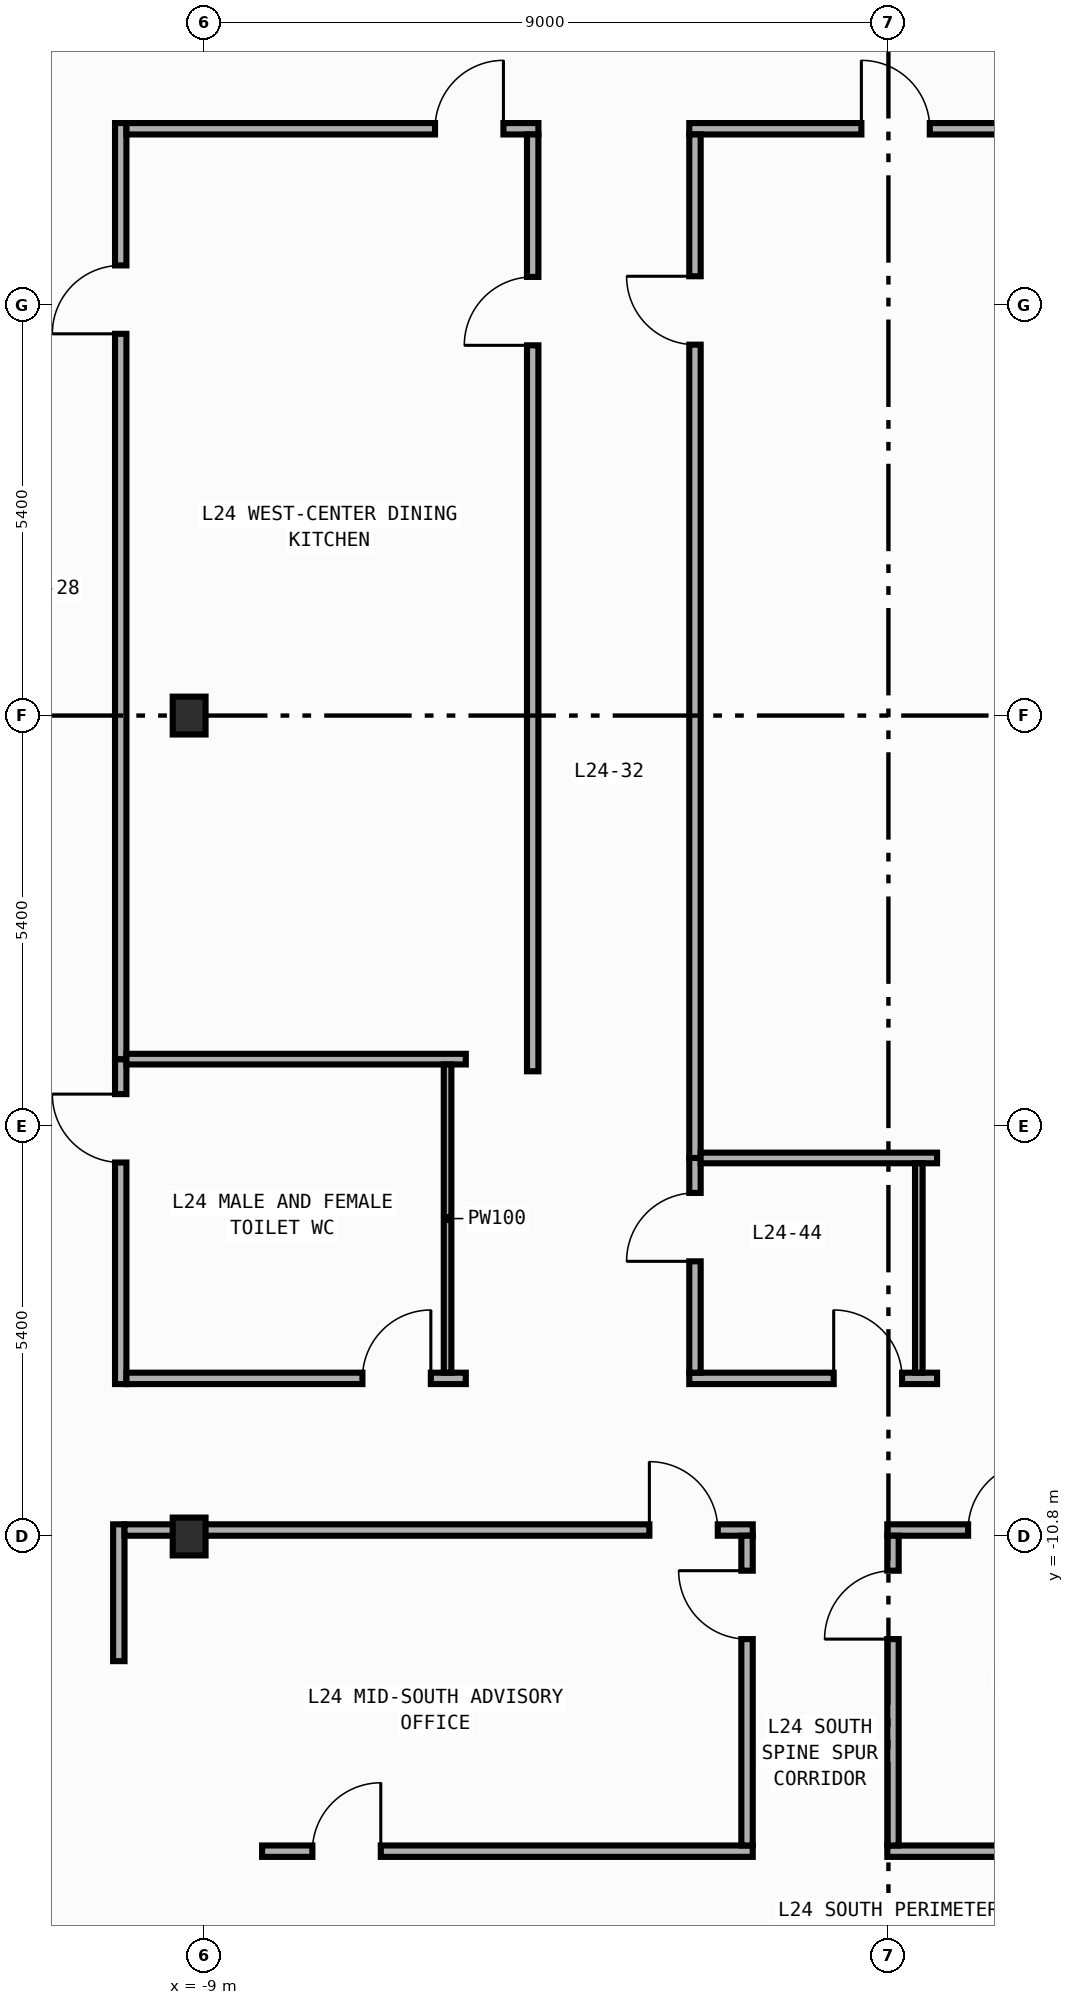
"""IFC4 building model, lengths in metres.
Left out: names, types, materials, properties, quantities, classifications, styles, units other than length and angle.
Written with IfcOpenShell. Run it as: python <this file> out.ifc"""

import sys

from ifc_helpers import new_model, si_unit, direction, frame, frame_2d, origin, origin_2d, place, context, subcontext, project, spatial, rectangle, i_section, extrude, element, fill, save


model = new_model("IFC4")
c1 = context("Model", 3, precision=1e-05, world=origin(), true_north=direction((0.0, 1.0)))
c2 = subcontext(c1, "Body", "Model", "MODEL_VIEW")
j1 = project(units=[si_unit("LENGTHUNIT", "METRE"), si_unit("PLANEANGLEUNIT", "RADIAN")], contexts=[c1])
p1 = place(None, origin())
s1 = spatial("IfcSite", under=j1, at=p1, CompositionType="ELEMENT")
p2 = place(p1, origin())
s2 = spatial("IfcBuilding", under=s1, at=p2, CompositionType="ELEMENT")
p3 = place(p2, frame((0.0, 0.0, 105.8)))
s3 = spatial("IfcBuildingStorey", under=s2, at=p3, CompositionType="ELEMENT", Elevation=105.8)
for number, where, z_axis, x_axis in (
    (1, (-9.2, -10.8, 0.0), (0.0, 0.0, 1.0), (1.0, 0.0, 0.0)),
    (2, (-9.2, 0.0, 0.0), (0.0, 0.0, 1.0), (1.0, 0.0, 0.0)),
):
    element("IfcColumn", number, at=place(p3, frame(where, z_axis=z_axis, x_axis=x_axis)), inside=s3, PredefinedType="COLUMN", context=c2, shape_type="SweptSolid", body=[
        extrude(i_section(OverallWidth=0.432, OverallDepth=0.498, WebThickness=0.045, FlangeThickness=0.07, FilletRadius=0.022, at=origin_2d()), origin(), (0.0, 0.0, 1.0), 4.2),
    ])
p4 = place(p3, frame((-10.1, -8.795, 0.0), z_axis=(0.0, 0.0, 1.0), x_axis=(0.0, 1.0, 0.0)))
e3 = element("IfcWall", 3, at=p4, inside=s3, PredefinedType="PARTITIONING", context=c2, shape_type="SweptSolid", body=[
    extrude(rectangle(XDim=4.275, YDim=0.15, at=frame_2d((2.137, 0.0))), origin(), (0.0, 0.0, 1.0), 3.94),
])
p5 = place(p4, frame((2.915, 0.0, 0.0)))
e4 = element("IfcOpeningElement", 4, at=p5, cuts=e3, PredefinedType="OPENING", context=c2, shape_type="SweptSolid", body=[
    extrude(rectangle(XDim=0.9, YDim=2.15, at=frame_2d((0.45, 1.075))), frame((0.0, 0.085, 0.0), z_axis=(0.0, -1.0, 0.0), x_axis=(1.0, 0.0, 0.0)), (0.0, 0.0, 1.0), 0.17),
])
p6 = place(p3, frame((-10.1, -4.52, 0.0), z_axis=(0.0, 0.0, 1.0), x_axis=(0.0, 1.0, 0.0)))
e5 = element("IfcWall", 5, at=p6, inside=s3, PredefinedType="PARTITIONING", context=c2, shape_type="SweptSolid", body=[
    extrude(rectangle(XDim=12.315, YDim=0.15, at=frame_2d((6.157, 0.0))), origin(), (0.0, 0.0, 1.0), 3.94),
])
p7 = place(p6, frame((9.542, 0.0, 0.0)))
e6 = element("IfcOpeningElement", 6, at=p7, cuts=e5, PredefinedType="OPENING", context=c2, shape_type="SweptSolid", body=[
    extrude(rectangle(XDim=0.9, YDim=2.15, at=frame_2d((0.45, 1.075))), frame((0.0, 0.085, 0.0), z_axis=(0.0, -1.0, 0.0), x_axis=(1.0, 0.0, 0.0)), (0.0, 0.0, 1.0), 0.17),
])
p8 = place(p3, frame((-10.125, -12.44, 0.0), z_axis=(0.0, 0.0, 1.0), x_axis=(0.0, 1.0, 0.0)))
e7 = element("IfcWall", 7, at=p8, inside=s3, PredefinedType="PARTITIONING", context=c2, shape_type="SweptSolid", body=[
    extrude(rectangle(XDim=1.8, YDim=0.15, at=frame_2d((0.9, 0.0))), origin(), (0.0, 0.0, 1.0), 3.94),
])
p9 = place(p3, frame((-2.62, 7.72, 0.0), z_axis=(0.0, 0.0, 1.0), x_axis=(1.0, 0.0, 0.0)))
e8 = element("IfcWall", 8, at=p9, inside=s3, PredefinedType="PARTITIONING", context=c2, shape_type="SweptSolid", body=[
    extrude(rectangle(XDim=12.645, YDim=0.15, at=frame_2d((6.323, 0.0))), origin(), (0.0, 0.0, 1.0), 3.94),
])
p10 = place(p9, frame((2.264, 0.0, 0.0)))
e9 = element("IfcOpeningElement", 9, at=p10, cuts=e8, PredefinedType="OPENING", context=c2, shape_type="SweptSolid", body=[
    extrude(rectangle(XDim=0.9, YDim=2.15, at=frame_2d((0.45, 1.075))), frame((0.0, 0.085, 0.0), z_axis=(0.0, -1.0, 0.0), x_axis=(1.0, 0.0, 0.0)), (0.0, 0.0, 1.0), 0.17),
])
p11 = place(p3, frame((-10.025, 7.72, 0.0), z_axis=(0.0, 0.0, 1.0), x_axis=(1.0, 0.0, 0.0)))
e10 = element("IfcWall", 10, at=p11, inside=s3, PredefinedType="PARTITIONING", context=c2, shape_type="SweptSolid", body=[
    extrude(rectangle(XDim=5.42, YDim=0.15, at=frame_2d((2.71, 0.0))), origin(), (0.0, 0.0, 1.0), 3.94),
])
p12 = place(p11, frame((4.06, 0.0, 0.0)))
e11 = element("IfcOpeningElement", 11, at=p12, cuts=e10, PredefinedType="OPENING", context=c2, shape_type="SweptSolid", body=[
    extrude(rectangle(XDim=0.9, YDim=2.15, at=frame_2d((0.45, 1.075))), frame((0.0, 0.085, 0.0), z_axis=(0.0, -1.0, 0.0), x_axis=(1.0, 0.0, 0.0)), (0.0, 0.0, 1.0), 0.17),
])
p13 = place(p3, frame((-2.62, -8.72, 0.0), z_axis=(0.0, 0.0, 1.0), x_axis=(1.0, 0.0, 0.0)))
e12 = element("IfcWall", 12, at=p13, inside=s3, PredefinedType="PARTITIONING", context=c2, shape_type="SweptSolid", body=[
    extrude(rectangle(XDim=3.26, YDim=0.15, at=frame_2d((1.63, 0.0))), origin(), (0.0, 0.0, 1.0), 3.94),
])
p14 = place(p13, frame((1.9, 0.0, 0.0)))
e13 = element("IfcOpeningElement", 13, at=p14, cuts=e12, PredefinedType="OPENING", context=c2, shape_type="SweptSolid", body=[
    extrude(rectangle(XDim=0.9, YDim=2.15, at=frame_2d((0.45, 1.075))), frame((0.0, 0.085, 0.0), z_axis=(0.0, -1.0, 0.0), x_axis=(1.0, 0.0, 0.0)), (0.0, 0.0, 1.0), 0.17),
])
p15 = place(p3, frame((-10.025, -8.72, 0.0), z_axis=(0.0, 0.0, 1.0), x_axis=(1.0, 0.0, 0.0)))
e14 = element("IfcWall", 14, at=p15, inside=s3, PredefinedType="PARTITIONING", context=c2, shape_type="SweptSolid", body=[
    extrude(rectangle(XDim=4.465, YDim=0.15, at=frame_2d((2.232, 0.0))), origin(), (0.0, 0.0, 1.0), 3.94),
])
p16 = place(p15, frame((3.105, 0.0, 0.0)))
e15 = element("IfcOpeningElement", 15, at=p16, cuts=e14, PredefinedType="OPENING", context=c2, shape_type="SweptSolid", body=[
    extrude(rectangle(XDim=0.9, YDim=2.15, at=frame_2d((0.45, 1.075))), frame((0.0, 0.085, 0.0), z_axis=(0.0, -1.0, 0.0), x_axis=(1.0, 0.0, 0.0)), (0.0, 0.0, 1.0), 0.17),
])
p17 = place(p3, frame((-10.05, -10.715, 0.0), z_axis=(0.0, 0.0, 1.0), x_axis=(1.0, 0.0, 0.0)))
e16 = element("IfcWall", 16, at=p17, inside=s3, PredefinedType="PARTITIONING", context=c2, shape_type="SweptSolid", body=[
    extrude(rectangle(XDim=8.265, YDim=0.15, at=frame_2d((4.133, 0.0))), origin(), (0.0, 0.0, 1.0), 3.24),
])
p18 = place(p17, frame((6.905, 0.0, 0.0)))
e17 = element("IfcOpeningElement", 17, at=p18, cuts=e16, PredefinedType="OPENING", context=c2, shape_type="SweptSolid", body=[
    extrude(rectangle(XDim=0.9, YDim=2.15, at=frame_2d((0.45, 1.075))), frame((0.0, 0.085, 0.0), z_axis=(0.0, -1.0, 0.0), x_axis=(1.0, 0.0, 0.0)), (0.0, 0.0, 1.0), 0.17),
])
p19 = place(p3, frame((-0.015, -10.715, 0.0), z_axis=(0.0, 0.0, 1.0), x_axis=(1.0, 0.0, 0.0)))
e18 = element("IfcWall", 18, at=p19, inside=s3, PredefinedType="PARTITIONING", context=c2, shape_type="SweptSolid", body=[
    extrude(rectangle(XDim=10.065, YDim=0.15, at=frame_2d((5.032, 0.0))), origin(), (0.0, 0.0, 1.0), 3.24),
])
p20 = place(p19, frame((1.063, 0.0, 0.0)))
e19 = element("IfcOpeningElement", 19, at=p20, cuts=e18, PredefinedType="OPENING", context=c2, shape_type="SweptSolid", body=[
    extrude(rectangle(XDim=0.9, YDim=2.15, at=frame_2d((0.45, 1.075))), frame((0.0, 0.085, 0.0), z_axis=(0.0, -1.0, 0.0), x_axis=(1.0, 0.0, 0.0)), (0.0, 0.0, 1.0), 0.17),
])
p21 = place(p3, frame((-2.545, -8.645, 0.0), z_axis=(0.0, 0.0, 1.0), x_axis=(0.0, 1.0, 0.0)))
e20 = element("IfcWall", 20, at=p21, inside=s3, PredefinedType="PARTITIONING", context=c2, shape_type="SweptSolid", body=[
    extrude(rectangle(XDim=2.825, YDim=0.15, at=frame_2d((1.413, 0.0))), origin(), (0.0, 0.0, 1.0), 3.94),
])
p22 = place(p21, frame((1.465, 0.0, 0.0)))
e21 = element("IfcOpeningElement", 21, at=p22, cuts=e20, PredefinedType="OPENING", context=c2, shape_type="SweptSolid", body=[
    extrude(rectangle(XDim=0.9, YDim=2.15, at=frame_2d((0.45, 1.075))), frame((0.0, 0.085, 0.0), z_axis=(0.0, -1.0, 0.0), x_axis=(1.0, 0.0, 0.0)), (0.0, 0.0, 1.0), 0.17),
])
p23 = place(p3, frame((-2.545, -5.82, 0.0), z_axis=(0.0, 0.0, 1.0), x_axis=(0.0, 1.0, 0.0)))
e22 = element("IfcWall", 22, at=p23, inside=s3, PredefinedType="PARTITIONING", context=c2, shape_type="SweptSolid", body=[
    extrude(rectangle(XDim=13.465, YDim=0.15, at=frame_2d((6.732, 0.0))), origin(), (0.0, 0.0, 1.0), 3.94),
])
p24 = place(p23, frame((10.7, 0.0, 0.0)))
e23 = element("IfcOpeningElement", 23, at=p24, cuts=e22, PredefinedType="OPENING", context=c2, shape_type="SweptSolid", body=[
    extrude(rectangle(XDim=0.9, YDim=2.15, at=frame_2d((0.45, 1.075))), frame((0.0, 0.085, 0.0), z_axis=(0.0, -1.0, 0.0), x_axis=(1.0, 0.0, 0.0)), (0.0, 0.0, 1.0), 0.17),
])
p25 = place(p3, frame((-4.68, -4.68, 0.0), z_axis=(0.0, 0.0, 1.0), x_axis=(0.0, 1.0, 0.0)))
e24 = element("IfcWall", 24, at=p25, inside=s3, PredefinedType="PARTITIONING", context=c2, shape_type="SweptSolid", body=[
    extrude(rectangle(XDim=12.325, YDim=0.15, at=frame_2d((6.163, 0.0))), origin(), (0.0, 0.0, 1.0), 3.49),
])
p26 = place(p25, frame((9.551, 0.0, 0.0)))
e25 = element("IfcOpeningElement", 25, at=p26, cuts=e24, PredefinedType="OPENING", context=c2, shape_type="SweptSolid", body=[
    extrude(rectangle(XDim=0.9, YDim=2.15, at=frame_2d((0.45, 1.075))), frame((0.0, 0.085, 0.0), z_axis=(0.0, -1.0, 0.0), x_axis=(1.0, 0.0, 0.0)), (0.0, 0.0, 1.0), 0.17),
])
p27 = place(p3, frame((-8.24, -14.94, 0.0), z_axis=(0.0, 0.0, 1.0), x_axis=(1.0, 0.0, 0.0)))
e26 = element("IfcWall", 26, at=p27, inside=s3, PredefinedType="PARTITIONING", context=c2, shape_type="SweptSolid", body=[
    extrude(rectangle(XDim=6.455, YDim=0.15, at=frame_2d((3.228, 0.0))), origin(), (0.0, 0.0, 1.0), 3.94),
])
p28 = place(p27, frame((0.662, 0.0, 0.0)))
e27 = element("IfcOpeningElement", 27, at=p28, cuts=e26, PredefinedType="OPENING", context=c2, shape_type="SweptSolid", body=[
    extrude(rectangle(XDim=0.9, YDim=2.15, at=frame_2d((0.45, 1.075))), frame((0.0, 0.085, 0.0), z_axis=(0.0, -1.0, 0.0), x_axis=(1.0, 0.0, 0.0)), (0.0, 0.0, 1.0), 0.17),
])
p29 = place(p3, frame((-0.015, -14.94, 0.0), z_axis=(0.0, 0.0, 1.0), x_axis=(1.0, 0.0, 0.0)))
e28 = element("IfcWall", 28, at=p29, inside=s3, PredefinedType="PARTITIONING", context=c2, shape_type="SweptSolid", body=[
    extrude(rectangle(XDim=8.255, YDim=0.15, at=frame_2d((4.127, 0.0))), origin(), (0.0, 0.0, 1.0), 3.94),
])
p30 = place(p29, frame((6.694, 0.0, 0.0)))
e29 = element("IfcOpeningElement", 29, at=p30, cuts=e28, PredefinedType="OPENING", context=c2, shape_type="SweptSolid", body=[
    extrude(rectangle(XDim=0.9, YDim=2.15, at=frame_2d((0.45, 1.075))), frame((0.0, 0.085, 0.0), z_axis=(0.0, -1.0, 0.0), x_axis=(1.0, 0.0, 0.0)), (0.0, 0.0, 1.0), 0.17),
])
p31 = place(p3, frame((-1.86, -14.865, 0.0), z_axis=(0.0, 0.0, 1.0), x_axis=(0.0, 1.0, 0.0)))
e30 = element("IfcWall", 30, at=p31, inside=s3, PredefinedType="PARTITIONING", context=c2, shape_type="SweptSolid", body=[
    extrude(rectangle(XDim=4.075, YDim=0.15, at=frame_2d((2.038, 0.0))), origin(), (0.0, 0.0, 1.0), 3.94),
])
p32 = place(p31, frame((2.715, 0.0, 0.0)))
e31 = element("IfcOpeningElement", 31, at=p32, cuts=e30, PredefinedType="OPENING", context=c2, shape_type="SweptSolid", body=[
    extrude(rectangle(XDim=0.9, YDim=2.15, at=frame_2d((0.45, 1.075))), frame((0.0, 0.085, 0.0), z_axis=(0.0, -1.0, 0.0), x_axis=(1.0, 0.0, 0.0)), (0.0, 0.0, 1.0), 0.17),
])
p33 = place(p3, frame((0.06, -14.865, 0.0), z_axis=(0.0, 0.0, 1.0), x_axis=(0.0, 1.0, 0.0)))
e32 = element("IfcWall", 32, at=p33, inside=s3, PredefinedType="PARTITIONING", context=c2, shape_type="SweptSolid", body=[
    extrude(rectangle(XDim=4.075, YDim=0.15, at=frame_2d((2.038, 0.0))), origin(), (0.0, 0.0, 1.0), 3.94),
])
p34 = place(p33, frame((2.715, 0.0, 0.0)))
e33 = element("IfcOpeningElement", 33, at=p34, cuts=e32, PredefinedType="OPENING", context=c2, shape_type="SweptSolid", body=[
    extrude(rectangle(XDim=0.9, YDim=2.15, at=frame_2d((0.45, 1.075))), frame((0.0, 0.085, 0.0), z_axis=(0.0, -1.0, 0.0), x_axis=(1.0, 0.0, 0.0)), (0.0, 0.0, 1.0), 0.17),
])
p35 = place(p3, frame((-2.47, -5.82, 0.0), z_axis=(0.0, 0.0, 1.0), x_axis=(1.0, 0.0, 0.0)))
e34 = element("IfcWall", 34, at=p35, inside=s3, PredefinedType="PARTITIONING", context=c2, shape_type="SweptSolid", body=[
    extrude(rectangle(XDim=3.11, YDim=0.14, at=frame_2d((1.555, 0.0))), origin(), (0.0, 0.0, 1.0), 3.94),
])
p36 = place(p3, frame((-10.025, -4.52, 0.0), z_axis=(0.0, 0.0, 1.0), x_axis=(1.0, 0.0, 0.0)))
e35 = element("IfcWall", 35, at=p36, inside=s3, PredefinedType="PARTITIONING", context=c2, shape_type="SweptSolid", body=[
    extrude(rectangle(XDim=4.465, YDim=0.14, at=frame_2d((2.232, 0.0))), origin(), (0.0, 0.0, 1.0), 3.94),
])
p37 = place(p3, frame((0.4, -5.89, 0.0), z_axis=(0.0, 0.0, 1.0), x_axis=(0.0, -1.0, 0.0)))
e36 = element("IfcWall", 36, at=p37, inside=s3, PredefinedType="PARTITIONING", context=c2, shape_type="SweptSolid", body=[
    extrude(rectangle(XDim=2.755, YDim=0.1, at=frame_2d((1.377, 0.0))), origin(), (0.0, 0.0, 1.0), 3.94),
])
p38 = place(p3, frame((-5.8, -4.59, 0.0), z_axis=(0.0, 0.0, 1.0), x_axis=(0.0, -1.0, 0.0)))
e37 = element("IfcWall", 37, at=p38, inside=s3, PredefinedType="PARTITIONING", context=c2, shape_type="SweptSolid", body=[
    extrude(rectangle(XDim=4.055, YDim=0.1, at=frame_2d((2.027, 0.0))), origin(), (0.0, 0.0, 1.0), 3.94),
])
p39 = place(p5, origin())
e38 = element("IfcDoor", 38, at=p39, inside=s3, OperationType="SINGLE_SWING_RIGHT", PredefinedType="DOOR", context=c2, shape_type="SweptSolid", body=[
    extrude(rectangle(XDim=0.9, YDim=2.15, at=frame_2d((0.45, 1.075))), frame((0.0, 0.025, 0.0), z_axis=(0.0, -1.0, 0.0), x_axis=(1.0, 0.0, 0.0)), (0.0, 0.0, 1.0), 0.05),
])
fill(e4, e38)
p40 = place(p7, origin())
e39 = element("IfcDoor", 39, at=p40, inside=s3, OperationType="SINGLE_SWING_LEFT", PredefinedType="DOOR", context=c2, shape_type="SweptSolid", body=[
    extrude(rectangle(XDim=0.9, YDim=2.15, at=frame_2d((0.45, 1.075))), frame((0.0, 0.025, 0.0), z_axis=(0.0, -1.0, 0.0), x_axis=(1.0, 0.0, 0.0)), (0.0, 0.0, 1.0), 0.05),
])
fill(e6, e39)
p41 = place(p10, origin())
e40 = element("IfcDoor", 40, at=p41, inside=s3, OperationType="SINGLE_SWING_LEFT", PredefinedType="DOOR", context=c2, shape_type="SweptSolid", body=[
    extrude(rectangle(XDim=0.9, YDim=2.15, at=frame_2d((0.45, 1.075))), frame((0.0, 0.025, 0.0), z_axis=(0.0, -1.0, 0.0), x_axis=(1.0, 0.0, 0.0)), (0.0, 0.0, 1.0), 0.05),
])
fill(e9, e40)
p42 = place(p12, origin())
e41 = element("IfcDoor", 41, at=p42, inside=s3, OperationType="SINGLE_SWING_RIGHT", PredefinedType="DOOR", context=c2, shape_type="SweptSolid", body=[
    extrude(rectangle(XDim=0.9, YDim=2.15, at=frame_2d((0.45, 1.075))), frame((0.0, 0.025, 0.0), z_axis=(0.0, -1.0, 0.0), x_axis=(1.0, 0.0, 0.0)), (0.0, 0.0, 1.0), 0.05),
])
fill(e11, e41)
p43 = place(p14, origin())
e42 = element("IfcDoor", 42, at=p43, inside=s3, OperationType="SINGLE_SWING_LEFT", PredefinedType="DOOR", context=c2, shape_type="SweptSolid", body=[
    extrude(rectangle(XDim=0.9, YDim=2.15, at=frame_2d((0.45, 1.075))), frame((0.0, 0.025, 0.0), z_axis=(0.0, -1.0, 0.0), x_axis=(1.0, 0.0, 0.0)), (0.0, 0.0, 1.0), 0.05),
])
fill(e13, e42)
p44 = place(p16, origin())
e43 = element("IfcDoor", 43, at=p44, inside=s3, OperationType="SINGLE_SWING_RIGHT", PredefinedType="DOOR", context=c2, shape_type="SweptSolid", body=[
    extrude(rectangle(XDim=0.9, YDim=2.15, at=frame_2d((0.45, 1.075))), frame((0.0, 0.025, 0.0), z_axis=(0.0, -1.0, 0.0), x_axis=(1.0, 0.0, 0.0)), (0.0, 0.0, 1.0), 0.05),
])
fill(e15, e43)
p45 = place(p18, origin())
e44 = element("IfcDoor", 44, at=p45, inside=s3, OperationType="SINGLE_SWING_LEFT", PredefinedType="DOOR", context=c2, shape_type="SweptSolid", body=[
    extrude(rectangle(XDim=0.9, YDim=2.15, at=frame_2d((0.45, 1.075))), frame((0.0, 0.025, 0.0), z_axis=(0.0, -1.0, 0.0), x_axis=(1.0, 0.0, 0.0)), (0.0, 0.0, 1.0), 0.05),
])
fill(e17, e44)
p46 = place(p20, origin())
e45 = element("IfcDoor", 45, at=p46, inside=s3, OperationType="SINGLE_SWING_RIGHT", PredefinedType="DOOR", context=c2, shape_type="SweptSolid", body=[
    extrude(rectangle(XDim=0.9, YDim=2.15, at=frame_2d((0.45, 1.075))), frame((0.0, 0.025, 0.0), z_axis=(0.0, -1.0, 0.0), x_axis=(1.0, 0.0, 0.0)), (0.0, 0.0, 1.0), 0.05),
])
fill(e19, e45)
p47 = place(p22, origin())
e46 = element("IfcDoor", 46, at=p47, inside=s3, OperationType="SINGLE_SWING_LEFT", PredefinedType="DOOR", context=c2, shape_type="SweptSolid", body=[
    extrude(rectangle(XDim=0.9, YDim=2.15, at=frame_2d((0.45, 1.075))), frame((0.0, 0.025, 0.0), z_axis=(0.0, -1.0, 0.0), x_axis=(1.0, 0.0, 0.0)), (0.0, 0.0, 1.0), 0.05),
])
fill(e21, e46)
p48 = place(p24, origin())
e47 = element("IfcDoor", 47, at=p48, inside=s3, OperationType="SINGLE_SWING_RIGHT", PredefinedType="DOOR", context=c2, shape_type="SweptSolid", body=[
    extrude(rectangle(XDim=0.9, YDim=2.15, at=frame_2d((0.45, 1.075))), frame((0.0, 0.025, 0.0), z_axis=(0.0, -1.0, 0.0), x_axis=(1.0, 0.0, 0.0)), (0.0, 0.0, 1.0), 0.05),
])
fill(e23, e47)
p49 = place(p26, origin())
e48 = element("IfcDoor", 48, at=p49, inside=s3, OperationType="SINGLE_SWING_LEFT", PredefinedType="DOOR", context=c2, shape_type="SweptSolid", body=[
    extrude(rectangle(XDim=0.9, YDim=2.15, at=frame_2d((0.45, 1.075))), frame((0.0, 0.025, 0.0), z_axis=(0.0, -1.0, 0.0), x_axis=(1.0, 0.0, 0.0)), (0.0, 0.0, 1.0), 0.05),
])
fill(e25, e48)
p50 = place(p28, origin())
e49 = element("IfcDoor", 49, at=p50, inside=s3, OperationType="SINGLE_SWING_RIGHT", PredefinedType="DOOR", context=c2, shape_type="SweptSolid", body=[
    extrude(rectangle(XDim=0.9, YDim=2.15, at=frame_2d((0.45, 1.075))), frame((0.0, 0.025, 0.0), z_axis=(0.0, -1.0, 0.0), x_axis=(1.0, 0.0, 0.0)), (0.0, 0.0, 1.0), 0.05),
])
fill(e27, e49)
p51 = place(p32, origin())
e50 = element("IfcDoor", 50, at=p51, inside=s3, OperationType="SINGLE_SWING_RIGHT", PredefinedType="DOOR", context=c2, shape_type="SweptSolid", body=[
    extrude(rectangle(XDim=0.9, YDim=2.15, at=frame_2d((0.45, 1.075))), frame((0.0, 0.025, 0.0), z_axis=(0.0, -1.0, 0.0), x_axis=(1.0, 0.0, 0.0)), (0.0, 0.0, 1.0), 0.05),
])
fill(e31, e50)
p52 = place(p34, origin())
e51 = element("IfcDoor", 51, at=p52, inside=s3, OperationType="SINGLE_SWING_LEFT", PredefinedType="DOOR", context=c2, shape_type="SweptSolid", body=[
    extrude(rectangle(XDim=0.9, YDim=2.15, at=frame_2d((0.45, 1.075))), frame((0.0, 0.025, 0.0), z_axis=(0.0, -1.0, 0.0), x_axis=(1.0, 0.0, 0.0)), (0.0, 0.0, 1.0), 0.05),
])
fill(e33, e51)
save(model, sys.argv[1])
